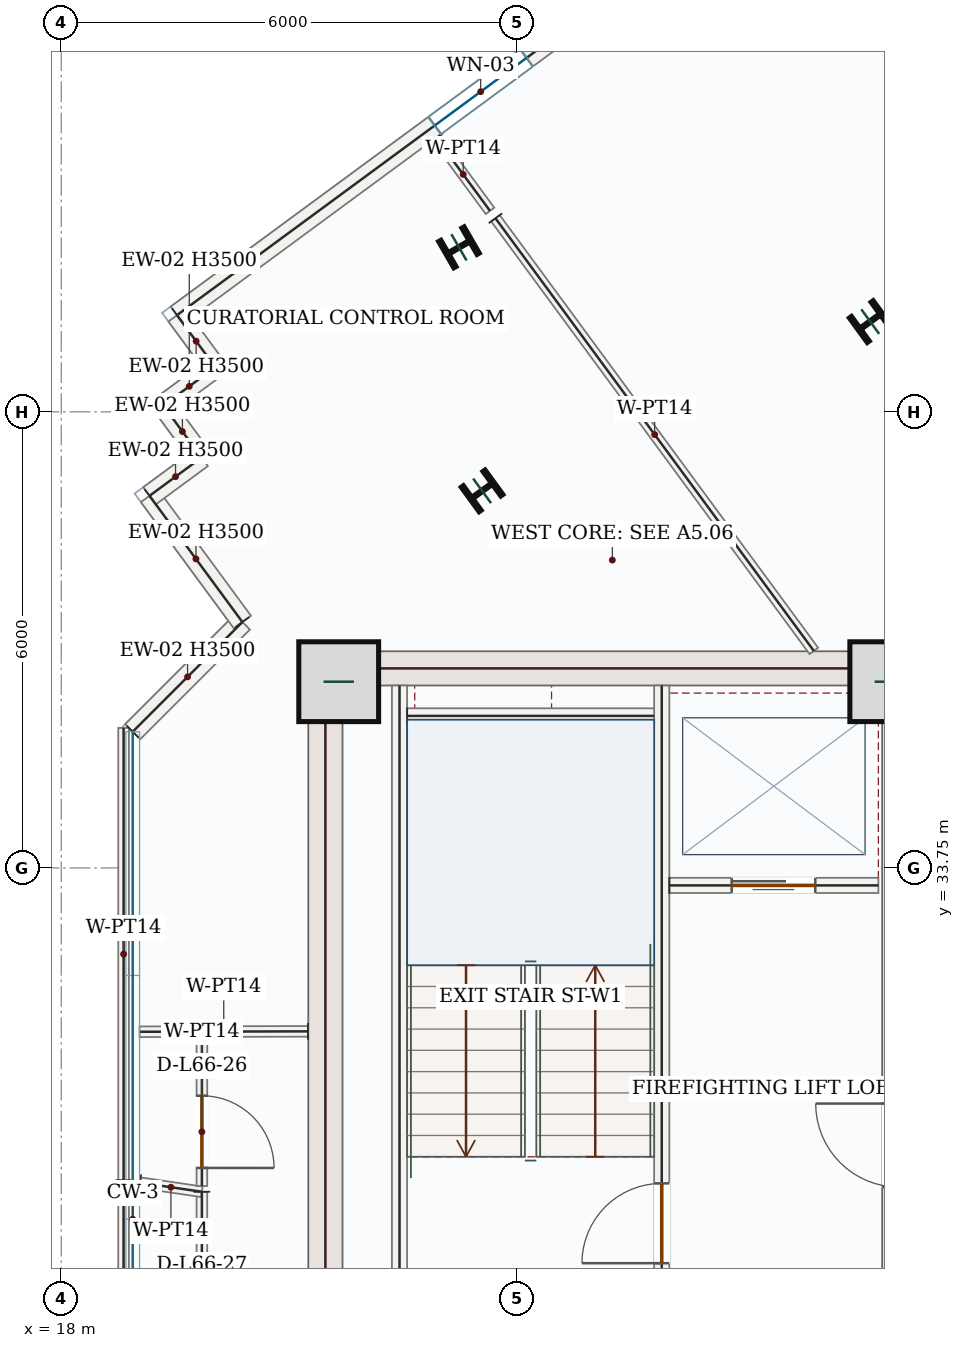
"""IFC4 building model, lengths in metres.
Left out: names, types, materials, properties, quantities, classifications, styles, units other than length and angle.
Written with IfcOpenShell. Run it as: python <this file> out.ifc"""

import sys

from ifc_helpers import new_model, si_unit, direction, frame, frame_2d, origin, origin_2d, place, context, subcontext, project, spatial, rectangle, i_section, extrude, source, transform, mapped, element, fill, save


model = new_model("IFC4")
c1 = context("Model", 3, precision=1e-05, world=origin(), true_north=direction((0.0, 1.0)))
c2 = subcontext(c1, "Body", "Model", "MODEL_VIEW")
j1 = project(units=[si_unit("LENGTHUNIT", "METRE"), si_unit("PLANEANGLEUNIT", "RADIAN")], contexts=[c1])
p1 = place(None, origin())
s1 = spatial("IfcSite", under=j1, at=p1, CompositionType="ELEMENT")
p2 = place(p1, origin())
s2 = spatial("IfcBuilding", under=s1, at=p2, CompositionType="ELEMENT")
p3 = place(p2, frame((0.0, 0.0, 276.6)))
s3 = spatial("IfcBuildingStorey", under=s2, at=p3, CompositionType="ELEMENT", Elevation=276.6)
m1 = source(origin(), c2, "Body", "SweptSolid", [
    extrude(rectangle(XDim=8.55, YDim=0.45, at=frame_2d((4.275, 0.0))), origin(), (0.0, 0.0, 1.0), 3.5),
])
p4 = place(p3, frame((21.475, 28.05, 0.0), z_axis=(0.0, 0.0, 1.0), x_axis=(0.0, 1.0, 0.0)))
e1 = element("IfcWall", 1, at=p4, inside=s3, PredefinedType="SHEAR", context=c2, shape_type="MappedRepresentation", body=[
    mapped(m1, transform((0.0, 0.0, 0.0), x_axis=(1.0, 0.0, 0.0), y_axis=(0.0, 1.0, 0.0), z_axis=(0.0, 0.0, 1.0), scale=1.0)),
])
p5 = place(p3, frame((29.025, 28.05, 0.0), z_axis=(0.0, 0.0, 1.0), x_axis=(0.0, 1.0, 0.0)))
e2 = element("IfcWall", 2, at=p5, inside=s3, PredefinedType="SHEAR", context=c2, shape_type="SweptSolid", body=[
    extrude(rectangle(XDim=8.55, YDim=0.45, at=frame_2d((4.275, 0.0))), origin(), (0.0, 0.0, 1.0), 3.5),
])
p6 = place(p5, frame((1.5, 0.0, 0.0)))
e3 = element("IfcOpeningElement", 3, at=p6, cuts=e2, PredefinedType="OPENING", context=c2, shape_type="SweptSolid", body=[
    extrude(rectangle(XDim=1.1, YDim=2.2, at=frame_2d((0.55, 1.1))), frame((0.0, 0.235, 0.0), z_axis=(0.0, -1.0, 0.0), x_axis=(1.0, 0.0, 0.0)), (0.0, 0.0, 1.0), 0.47),
])
m2 = source(origin(), c2, "Body", "SweptSolid", [
    extrude(rectangle(XDim=7.1, YDim=0.45, at=frame_2d((3.55, 0.0))), origin(), (0.0, 0.0, 1.0), 3.5),
])
p7 = place(p3, frame((21.7, 36.375, 0.0), z_axis=(0.0, 0.0, 1.0), x_axis=(1.0, 0.0, 0.0)))
e4 = element("IfcWall", 4, at=p7, inside=s3, PredefinedType="SHEAR", context=c2, shape_type="MappedRepresentation", body=[
    mapped(m2, transform((0.0, 0.0, 0.0), x_axis=(1.0, 0.0, 0.0), y_axis=(0.0, 1.0, 0.0), z_axis=(0.0, 0.0, 1.0), scale=1.0)),
])
m3 = source(origin(), c2, "Body", "SweptSolid", [
    extrude(rectangle(XDim=1.05, YDim=1.05, at=origin_2d()), origin(), (0.0, 0.0, 1.0), 3.75),
])
for number, where, z_axis, x_axis in (
    (5, (21.65, 36.2, 0.0), (0.0, 0.0, 1.0), (1.0, 0.0, 0.0)),
    (6, (28.9, 36.2, 0.0), (0.0, 0.0, 1.0), (1.0, 0.0, 0.0)),
):
    element("IfcColumn", number, at=place(p3, frame(where, z_axis=z_axis, x_axis=x_axis)), inside=s3, PredefinedType="COLUMN", context=c2, shape_type="MappedRepresentation", body=[
        mapped(m3, transform((0.0, 0.0, 0.0), x_axis=(1.0, 0.0, 0.0), y_axis=(0.0, 1.0, 0.0), z_axis=(0.0, 0.0, 1.0), scale=1.0)),
    ])
m4 = source(origin(), c2, "Body", "SweptSolid", [
    extrude(i_section(OverallWidth=0.399, OverallDepth=0.386, WebThickness=0.021, FlangeThickness=0.033, FilletRadius=0.018, at=origin_2d()), origin(), (0.0, 0.0, 1.0), 3.75),
])
for number, where, z_axis, x_axis in (
    (7, (28.643, 40.937, 0.0), (0.0, 0.0, 1.0), (-0.588, 0.809, 0.0)),
    (8, (23.536, 38.711, 0.0), (0.0, 0.0, 1.0), (-0.588, 0.809, 0.0)),
    (9, (23.232, 41.914, 0.0), (0.0, 0.0, 1.0), (-0.5, 0.866, 0.0)),
):
    element("IfcColumn", number, at=place(p3, frame(where, z_axis=z_axis, x_axis=x_axis)), inside=s3, PredefinedType="COLUMN", context=c2, shape_type="MappedRepresentation", body=[
        mapped(m4, transform((0.0, 0.0, 0.0), x_axis=(1.0, 0.0, 0.0), y_axis=(0.0, 1.0, 0.0), z_axis=(0.0, 0.0, 1.0), scale=1.0)),
    ])
m5 = source(origin(), c2, "Body", "SweptSolid", [
    extrude(rectangle(XDim=2.041, YDim=0.28, at=frame_2d((1.02, 0.0))), origin(), (0.0, 0.0, 1.0), 3.5),
])
p8 = place(p3, frame((18.94, 35.542, 0.0), z_axis=(0.0, 0.0, 1.0), x_axis=(0.707106781187, 0.707106781187, 0.0)))
e10 = element("IfcWall", 10, at=p8, inside=s3, PredefinedType="SOLIDWALL", context=c2, shape_type="MappedRepresentation", body=[
    mapped(m5, transform((0.0, 0.0, 0.0), x_axis=(1.0, 0.0, 0.0), y_axis=(0.0, 1.0, 0.0), z_axis=(0.0, 0.0, 1.0), scale=1.0)),
])
m6 = source(origin(), c2, "Body", "SweptSolid", [
    extrude(rectangle(XDim=2.062, YDim=0.28, at=frame_2d((1.031, 0.0))), origin(), (0.0, 0.0, 1.0), 3.5),
])
p9 = place(p3, frame((20.383, 36.985, 0.0), z_axis=(0.0, 0.0, 1.0), x_axis=(-0.592718215209, 0.80540990642, 0.0)))
e11 = element("IfcWall", 11, at=p9, inside=s3, PredefinedType="SOLIDWALL", context=c2, shape_type="MappedRepresentation", body=[
    mapped(m6, transform((0.0, 0.0, 0.0), x_axis=(1.0, 0.0, 0.0), y_axis=(0.0, 1.0, 0.0), z_axis=(0.0, 0.0, 1.0), scale=1.0)),
])
m7 = source(origin(), c2, "Body", "SweptSolid", [
    extrude(rectangle(XDim=0.85, YDim=0.28, at=frame_2d((0.425, 0.0))), origin(), (0.0, 0.0, 1.0), 3.5),
])
p10 = place(p3, frame((19.161, 38.645, 0.0), z_axis=(0.0, 0.0, 1.0), x_axis=(0.80534450163, 0.592807079659, 0.0)))
e12 = element("IfcWall", 12, at=p10, inside=s3, PredefinedType="SOLIDWALL", context=c2, shape_type="MappedRepresentation", body=[
    mapped(m7, transform((0.0, 0.0, 0.0), x_axis=(1.0, 0.0, 0.0), y_axis=(0.0, 1.0, 0.0), z_axis=(0.0, 0.0, 1.0), scale=1.0)),
])
m8 = source(origin(), c2, "Body", "SweptSolid", [
    extrude(rectangle(XDim=0.85, YDim=0.28, at=frame_2d((0.425, 0.0))), origin(), (0.0, 0.0, 1.0), 3.5),
])
for number, where, z_axis, x_axis in (
    (13, (19.845, 39.149, 0.0), (0.0, 0.0, 1.0), (-0.593, 0.805, 0.0)),
    (14, (19.342, 39.834, 0.0), (0.0, 0.0, 1.0), (0.805, 0.593, 0.0)),
):
    element("IfcWall", number, at=place(p3, frame(where, z_axis=z_axis, x_axis=x_axis)), inside=s3, PredefinedType="SOLIDWALL", context=c2, shape_type="MappedRepresentation", body=[
        mapped(m8, transform((0.0, 0.0, 0.0), x_axis=(1.0, 0.0, 0.0), y_axis=(0.0, 1.0, 0.0), z_axis=(0.0, 0.0, 1.0), scale=1.0)),
    ])
m9 = source(origin(), c2, "Body", "SweptSolid", [
    extrude(rectangle(XDim=0.85, YDim=0.28, at=frame_2d((0.425, 0.0))), origin(), (0.0, 0.0, 1.0), 3.5),
])
p11 = place(p3, frame((20.026, 40.337, 0.0), z_axis=(0.0, 0.0, 1.0), x_axis=(-0.592669983425, 0.805445398986, 0.0)))
e15 = element("IfcWall", 15, at=p11, inside=s3, PredefinedType="SOLIDWALL", context=c2, shape_type="MappedRepresentation", body=[
    mapped(m9, transform((0.0, 0.0, 0.0), x_axis=(1.0, 0.0, 0.0), y_axis=(0.0, 1.0, 0.0), z_axis=(0.0, 0.0, 1.0), scale=1.0)),
])
p12 = place(p3, frame((19.522, 41.022, 0.0), z_axis=(0.0, 0.0, 1.0), x_axis=(0.805418797839, 0.592706132994, 0.0)))
e16 = element("IfcWall", 16, at=p12, inside=s3, PredefinedType="SOLIDWALL", context=c2, shape_type="SweptSolid", body=[
    extrude(rectangle(XDim=9.92, YDim=0.28, at=frame_2d((4.96, 0.0))), origin(), (0.0, 0.0, 1.0), 3.5),
])
p13 = place(p12, frame((4.21, 0.0, 0.85)))
e17 = element("IfcOpeningElement", 17, at=p13, cuts=e16, PredefinedType="OPENING", context=c2, shape_type="SweptSolid", body=[
    extrude(rectangle(XDim=1.5, YDim=1.5, at=frame_2d((0.75, 0.75))), frame((0.0, 0.15, 0.0), z_axis=(0.0, -1.0, 0.0), x_axis=(1.0, 0.0, 0.0)), (0.0, 0.0, 1.0), 0.3),
])
m10 = source(origin(), c2, "Body", "SweptSolid", [
    extrude(rectangle(XDim=7.87, YDim=0.2, at=frame_2d((3.935, 0.0))), origin(), (0.0, 0.0, 1.0), 3.5),
])
p14 = place(p3, frame((22.45, 28.28, 0.0), z_axis=(0.0, 0.0, 1.0), x_axis=(0.0, 1.0, 0.0)))
e18 = element("IfcWall", 18, at=p14, inside=s3, PredefinedType="SOLIDWALL", context=c2, shape_type="MappedRepresentation", body=[
    mapped(m10, transform((0.0, 0.0, 0.0), x_axis=(1.0, 0.0, 0.0), y_axis=(0.0, 1.0, 0.0), z_axis=(0.0, 0.0, 1.0), scale=1.0)),
])
p15 = place(p3, frame((25.9, 28.15, 0.0), z_axis=(0.0, 0.0, 1.0), x_axis=(0.0, 1.0, 0.0)))
e19 = element("IfcWall", 19, at=p15, inside=s3, PredefinedType="SOLIDWALL", context=c2, shape_type="SweptSolid", body=[
    extrude(rectangle(XDim=8.0, YDim=0.2, at=frame_2d((4.0, 0.0))), origin(), (0.0, 0.0, 1.0), 3.5),
])
p16 = place(p15, frame((0.4, 0.0, 0.0)))
e20 = element("IfcOpeningElement", 20, at=p16, cuts=e19, PredefinedType="OPENING", context=c2, shape_type="SweptSolid", body=[
    extrude(rectangle(XDim=1.05, YDim=2.15, at=frame_2d((0.525, 1.075))), frame((0.0, 0.11, 0.0), z_axis=(0.0, -1.0, 0.0), x_axis=(1.0, 0.0, 0.0)), (0.0, 0.0, 1.0), 0.22),
])
m11 = source(origin(), c2, "Body", "SweptSolid", [
    extrude(rectangle(XDim=3.25, YDim=0.2, at=frame_2d((1.625, 0.0))), origin(), (0.0, 0.0, 1.0), 3.5),
])
p17 = place(p3, frame((22.55, 35.75, 0.0), z_axis=(0.0, 0.0, 1.0), x_axis=(1.0, 0.0, 0.0)))
e21 = element("IfcWall", 21, at=p17, inside=s3, PredefinedType="SOLIDWALL", context=c2, shape_type="MappedRepresentation", body=[
    mapped(m11, transform((0.0, 0.0, 0.0), x_axis=(1.0, 0.0, 0.0), y_axis=(0.0, 1.0, 0.0), z_axis=(0.0, 0.0, 1.0), scale=1.0)),
])
p18 = place(p3, frame((26.0, 33.52, 0.0), z_axis=(0.0, 0.0, 1.0), x_axis=(1.0, 0.0, 0.0)))
e22 = element("IfcWall", 22, at=p18, inside=s3, PredefinedType="SOLIDWALL", context=c2, shape_type="SweptSolid", body=[
    extrude(rectangle(XDim=2.75, YDim=0.2, at=frame_2d((1.375, 0.0))), origin(), (0.0, 0.0, 1.0), 3.5),
])
p19 = place(p18, frame((0.82, 0.0, 0.0)))
e23 = element("IfcOpeningElement", 23, at=p19, cuts=e22, PredefinedType="OPENING", context=c2, shape_type="SweptSolid", body=[
    extrude(rectangle(XDim=1.1, YDim=2.15, at=frame_2d((0.55, 1.075))), frame((0.0, 0.11, 0.0), z_axis=(0.0, -1.0, 0.0), x_axis=(1.0, 0.0, 0.0)), (0.0, 0.0, 1.0), 0.22),
])
p20 = place(p3, frame((19.85, 29.49, 0.0), z_axis=(0.0, 0.0, 1.0), x_axis=(0.0, -1.0, 0.0)))
e24 = element("IfcWall", 24, at=p20, inside=s3, PredefinedType="PARTITIONING", context=c2, shape_type="SweptSolid", body=[
    extrude(rectangle(XDim=7.083, YDim=0.14, at=frame_2d((3.542, 0.0))), origin(), (0.0, 0.0, 1.0), 3.5),
])
p21 = place(p20, frame((1.349, 0.0, 0.0)))
e25 = element("IfcOpeningElement", 25, at=p21, cuts=e24, PredefinedType="OPENING", context=c2, shape_type="SweptSolid", body=[
    extrude(rectangle(XDim=0.95, YDim=2.15, at=frame_2d((0.475, 1.075))), frame((0.0, 0.08, 0.0), z_axis=(0.0, -1.0, 0.0), x_axis=(1.0, 0.0, 0.0)), (0.0, 0.0, 1.0), 0.16),
])
m12 = source(origin(), c2, "Body", "SweptSolid", [
    extrude(rectangle(XDim=6.836, YDim=0.14, at=frame_2d((3.418, 0.0))), origin(), (0.0, 0.0, 1.0), 3.5),
])
p22 = place(p3, frame((18.818, 22.805, 0.0), z_axis=(0.0, 0.0, 1.0), x_axis=(0.000285724478, 0.999999959181, 0.0)))
e26 = element("IfcWall", 26, at=p22, inside=s3, PredefinedType="PARTITIONING", context=c2, shape_type="MappedRepresentation", body=[
    mapped(m12, transform((0.0, 0.0, 0.0), x_axis=(1.0, 0.0, 0.0), y_axis=(0.0, 1.0, 0.0), z_axis=(0.0, 0.0, 1.0), scale=1.0)),
])
m13 = source(origin(), c2, "Body", "SweptSolid", [
    extrude(rectangle(XDim=0.824, YDim=0.14, at=frame_2d((0.412, 0.0))), origin(), (0.0, 0.0, 1.0), 3.5),
])
p23 = place(p3, frame((19.035, 29.609, 0.0), z_axis=(0.0, 0.0, 1.0), x_axis=(0.989445525715, -0.144905319579, 0.0)))
e27 = element("IfcWall", 27, at=p23, inside=s3, PredefinedType="PARTITIONING", context=c2, shape_type="MappedRepresentation", body=[
    mapped(m13, transform((0.0, 0.0, 0.0), x_axis=(1.0, 0.0, 0.0), y_axis=(0.0, 1.0, 0.0), z_axis=(0.0, 0.0, 1.0), scale=1.0)),
])
p24 = place(p3, frame((19.851, 31.596, 0.0), z_axis=(0.0, 0.0, 1.0), x_axis=(-0.000240384608, -0.999999971108, 0.0)))
e28 = element("IfcWall", 28, at=p24, inside=s3, PredefinedType="PARTITIONING", context=c2, shape_type="SweptSolid", body=[
    extrude(rectangle(XDim=2.031, YDim=0.14, at=frame_2d((1.016, 0.0))), origin(), (0.0, 0.0, 1.0), 3.5),
])
p25 = place(p24, frame((0.844, 0.0, 0.0)))
e29 = element("IfcOpeningElement", 29, at=p25, cuts=e28, PredefinedType="OPENING", context=c2, shape_type="SweptSolid", body=[
    extrude(rectangle(XDim=0.95, YDim=2.15, at=frame_2d((0.475, 1.075))), frame((0.0, 0.08, 0.0), z_axis=(0.0, -1.0, 0.0), x_axis=(1.0, 0.0, 0.0)), (0.0, 0.0, 1.0), 0.16),
])
m14 = source(origin(), c2, "Body", "SweptSolid", [
    extrude(rectangle(XDim=5.951, YDim=0.14, at=frame_2d((2.976, 0.0))), origin(), (0.0, 0.0, 1.0), 3.5),
])
p26 = place(p3, frame((18.82, 29.64, 0.0), z_axis=(0.0, 0.0, 1.0), x_axis=(0.0, 1.0, 0.0)))
e30 = element("IfcWall", 30, at=p26, inside=s3, PredefinedType="PARTITIONING", context=c2, shape_type="MappedRepresentation", body=[
    mapped(m14, transform((0.0, 0.0, 0.0), x_axis=(1.0, 0.0, 0.0), y_axis=(0.0, 1.0, 0.0), z_axis=(0.0, 0.0, 1.0), scale=1.0)),
])
m15 = source(origin(), c2, "Body", "SweptSolid", [
    extrude(rectangle(XDim=1.191, YDim=0.14, at=frame_2d((0.595, 0.0))), origin(), (0.0, 0.0, 1.0), 3.5),
])
p27 = place(p3, frame((22.935, 43.353, 0.0), z_axis=(0.0, 0.0, 1.0), x_axis=(0.592625306686, -0.80547827151, 0.0)))
e31 = element("IfcWall", 31, at=p27, inside=s3, PredefinedType="PARTITIONING", context=c2, shape_type="MappedRepresentation", body=[
    mapped(m15, transform((0.0, 0.0, 0.0), x_axis=(1.0, 0.0, 0.0), y_axis=(0.0, 1.0, 0.0), z_axis=(0.0, 0.0, 1.0), scale=1.0)),
])
m16 = source(origin(), c2, "Body", "SweptSolid", [
    extrude(rectangle(XDim=7.067, YDim=0.14, at=frame_2d((3.533, 0.0))), origin(), (0.0, 0.0, 1.0), 3.5),
])
p28 = place(p3, frame((23.712, 42.297, 0.0), z_axis=(0.0, 0.0, 1.0), x_axis=(0.592689830588, -0.805430794493, 0.0)))
e32 = element("IfcWall", 32, at=p28, inside=s3, PredefinedType="PARTITIONING", context=c2, shape_type="MappedRepresentation", body=[
    mapped(m16, transform((0.0, 0.0, 0.0), x_axis=(1.0, 0.0, 0.0), y_axis=(0.0, 1.0, 0.0), z_axis=(0.0, 0.0, 1.0), scale=1.0)),
])
m17 = source(origin(), c2, "Body", "SweptSolid", [
    extrude(rectangle(XDim=2.215, YDim=0.14, at=frame_2d((1.107, 0.0))), origin(), (0.0, 0.0, 1.0), 3.5),
])
p29 = place(p3, frame((21.245, 31.6, 0.0), z_axis=(0.0, 0.0, 1.0), x_axis=(-0.999997060242, -0.002424769682, 0.0)))
e33 = element("IfcWall", 33, at=p29, inside=s3, PredefinedType="PARTITIONING", context=c2, shape_type="MappedRepresentation", body=[
    mapped(m17, transform((0.0, 0.0, 0.0), x_axis=(1.0, 0.0, 0.0), y_axis=(0.0, 1.0, 0.0), z_axis=(0.0, 0.0, 1.0), scale=1.0)),
])
m18 = source(origin(), c2, "Body", "SweptSolid", [
    extrude(rectangle(XDim=1.5, YDim=1.5, at=frame_2d((0.75, 0.75))), frame((0.0, 0.03, 0.0), z_axis=(0.0, -1.0, 0.0), x_axis=(1.0, 0.0, 0.0)), (0.0, 0.0, 1.0), 0.06),
])
p30 = place(p13, origin())
e34 = element("IfcWindow", 34, at=p30, inside=s3, PartitioningType="SINGLE_PANEL", PredefinedType="WINDOW", context=c2, shape_type="MappedRepresentation", body=[
    mapped(m18, transform((0.0, 0.0, 0.0), x_axis=(1.0, 0.0, 0.0), y_axis=(0.0, 1.0, 0.0), z_axis=(0.0, 0.0, 1.0), scale=1.0)),
])
fill(e17, e34)
m19 = source(origin(), c2, "Body", "SweptSolid", [
    extrude(rectangle(XDim=1.05, YDim=2.15, at=frame_2d((0.525, 1.075))), frame((0.0, 0.025, 0.0), z_axis=(0.0, -1.0, 0.0), x_axis=(1.0, 0.0, 0.0)), (0.0, 0.0, 1.0), 0.05),
])
p31 = place(p16, origin())
e35 = element("IfcDoor", 35, at=p31, inside=s3, OperationType="SINGLE_SWING_LEFT", PredefinedType="DOOR", context=c2, shape_type="MappedRepresentation", body=[
    mapped(m19, transform((0.0, 0.0, 0.0), x_axis=(1.0, 0.0, 0.0), y_axis=(0.0, 1.0, 0.0), z_axis=(0.0, 0.0, 1.0), scale=1.0)),
])
fill(e20, e35)
m20 = source(origin(), c2, "Body", "SweptSolid", [
    extrude(rectangle(XDim=1.1, YDim=2.15, at=frame_2d((0.55, 1.075))), frame((0.0, 0.025, 0.0), z_axis=(0.0, -1.0, 0.0), x_axis=(1.0, 0.0, 0.0)), (0.0, 0.0, 1.0), 0.05),
])
p32 = place(p19, origin())
e36 = element("IfcDoor", 36, at=p32, inside=s3, OperationType="DOUBLE_DOOR_SLIDING", PredefinedType="DOOR", context=c2, shape_type="MappedRepresentation", body=[
    mapped(m20, transform((0.0, 0.0, 0.0), x_axis=(1.0, 0.0, 0.0), y_axis=(0.0, 1.0, 0.0), z_axis=(0.0, 0.0, 1.0), scale=1.0)),
])
fill(e23, e36)
m21 = source(origin(), c2, "Body", "SweptSolid", [
    extrude(rectangle(XDim=0.95, YDim=2.15, at=frame_2d((0.475, 1.075))), frame((0.0, 0.025, 0.0), z_axis=(0.0, -1.0, 0.0), x_axis=(1.0, 0.0, 0.0)), (0.0, 0.0, 1.0), 0.05),
])
p33 = place(p25, origin())
e37 = element("IfcDoor", 37, at=p33, inside=s3, OperationType="SINGLE_SWING_RIGHT", PredefinedType="DOOR", context=c2, shape_type="MappedRepresentation", body=[
    mapped(m21, transform((0.0, 0.0, 0.0), x_axis=(1.0, 0.0, 0.0), y_axis=(0.0, 1.0, 0.0), z_axis=(0.0, 0.0, 1.0), scale=1.0)),
])
fill(e29, e37)
save(model, sys.argv[1])
